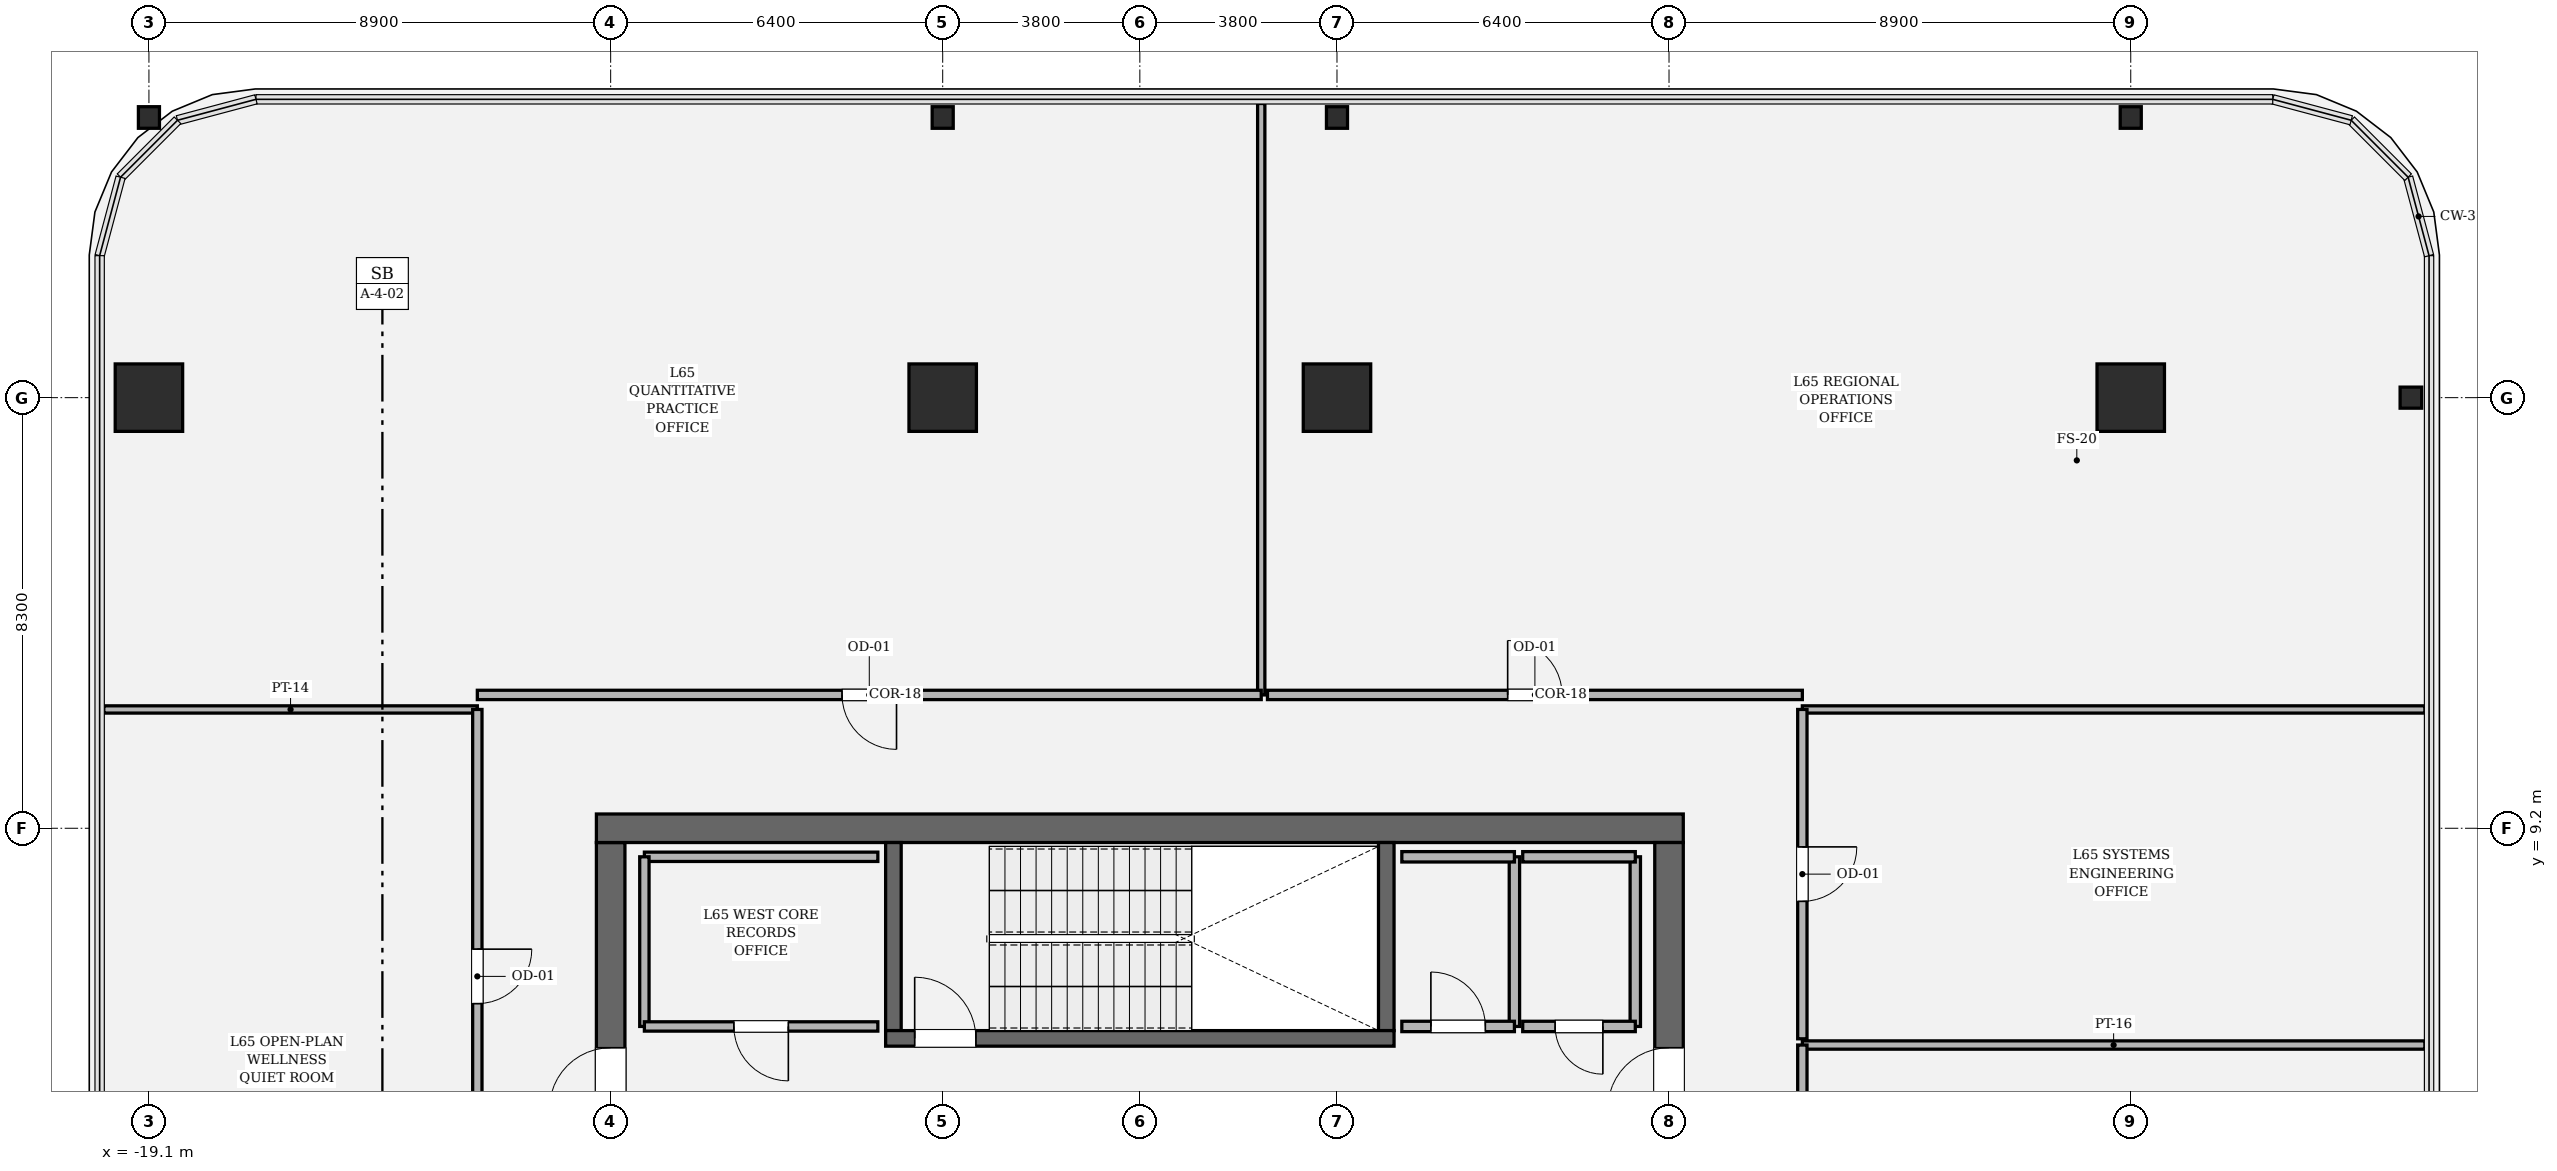
"""IFC4 building model, lengths in metres.
Left out: names, types, materials, properties, quantities, classifications, styles, units other than length and angle.
Written with IfcOpenShell. Run it as: python <this file> out.ifc"""

import sys

from ifc_helpers import new_model, si_unit, direction, frame, frame_2d, origin, origin_2d, place, context, subcontext, project, spatial, rectangle, hollow_rectangle, i_section, extrude, element, fill, save


model = new_model("IFC4")
c1 = context("Model", 3, precision=1e-05, world=origin(), true_north=direction((0.0, 1.0)))
c2 = subcontext(c1, "Body", "Model", "MODEL_VIEW")
j1 = project(units=[si_unit("LENGTHUNIT", "METRE"), si_unit("PLANEANGLEUNIT", "RADIAN")], contexts=[c1])
p1 = place(None, origin())
s1 = spatial("IfcSite", under=j1, at=p1, CompositionType="ELEMENT")
p2 = place(p1, origin())
s2 = spatial("IfcBuilding", under=s1, at=p2, CompositionType="ELEMENT")
p3 = place(p2, frame((0.0, 0.0, 275.7)))
s3 = spatial("IfcBuildingStorey", under=s2, at=p3, CompositionType="ELEMENT", Elevation=275.7)
p4 = place(p3, frame((-10.2, -8.925, 0.0), z_axis=(0.0, 0.0, 1.0), x_axis=(0.0, 1.0, 0.0)))
e1 = element("IfcWall", 1, at=p4, inside=s3, PredefinedType="SHEAR", context=c2, shape_type="SweptSolid", body=[
    extrude(rectangle(XDim=17.85, YDim=0.55, at=frame_2d((8.925, 0.0))), origin(), (0.0, 0.0, 1.0), 4.05),
])
p5 = place(p4, frame((12.715, 0.0, 0.0)))
e2 = element("IfcOpeningElement", 2, at=p5, cuts=e1, PredefinedType="OPENING", context=c2, shape_type="SweptSolid", body=[
    extrude(rectangle(XDim=1.18, YDim=2.2, at=frame_2d((0.59, 1.1))), frame((0.0, 0.285, 0.0), z_axis=(0.0, -1.0, 0.0), x_axis=(1.0, 0.0, 0.0)), (0.0, 0.0, 1.0), 0.57),
])
p6 = place(p3, frame((-10.475, 9.2, 0.0), z_axis=(0.0, 0.0, 1.0), x_axis=(1.0, 0.0, 0.0)))
e3 = element("IfcWall", 3, at=p6, inside=s3, PredefinedType="SHEAR", context=c2, shape_type="SweptSolid", body=[
    extrude(rectangle(XDim=20.95, YDim=0.55, at=frame_2d((10.475, 0.0))), origin(), (0.0, 0.0, 1.0), 4.05),
])
p7 = place(p3, frame((10.2, 8.925, 0.0), z_axis=(0.0, 0.0, 1.0), x_axis=(0.0, -1.0, 0.0)))
e4 = element("IfcWall", 4, at=p7, inside=s3, PredefinedType="SHEAR", context=c2, shape_type="SweptSolid", body=[
    extrude(rectangle(XDim=17.85, YDim=0.55, at=frame_2d((8.925, 0.0))), origin(), (0.0, 0.0, 1.0), 4.05),
])
p8 = place(p7, frame((3.955, 0.0, 0.0)))
e5 = element("IfcOpeningElement", 5, at=p8, cuts=e4, PredefinedType="OPENING", context=c2, shape_type="SweptSolid", body=[
    extrude(rectangle(XDim=1.18, YDim=2.2, at=frame_2d((0.59, 1.1))), frame((0.0, 0.285, 0.0), z_axis=(0.0, -1.0, 0.0), x_axis=(1.0, 0.0, 0.0)), (0.0, 0.0, 1.0), 0.57),
])
for number, where, z_axis, x_axis in (
    (6, (-4.75, 5.3, 0.0), (0.0, 0.0, 1.0), (0.0, 1.0, 0.0)),
    (7, (4.75, 8.925, 0.0), (0.0, 0.0, 1.0), (0.0, -1.0, 0.0)),
):
    element("IfcWall", number, at=place(p3, frame(where, z_axis=z_axis, x_axis=x_axis)), inside=s3, PredefinedType="SOLIDWALL", context=c2, shape_type="SweptSolid", body=[
        extrude(rectangle(XDim=3.625, YDim=0.3, at=frame_2d((1.812, 0.0))), origin(), (0.0, 0.0, 1.0), 4.05),
    ])
p9 = place(p3, frame((-4.9, 5.15, 0.0), z_axis=(0.0, 0.0, 1.0), x_axis=(1.0, 0.0, 0.0)))
e8 = element("IfcWall", 8, at=p9, inside=s3, PredefinedType="SOLIDWALL", context=c2, shape_type="SweptSolid", body=[
    extrude(rectangle(XDim=9.8, YDim=0.3, at=frame_2d((4.9, 0.0))), origin(), (0.0, 0.0, 1.0), 4.05),
])
p10 = place(p9, frame((0.56, 0.0, 0.0)))
e9 = element("IfcOpeningElement", 9, at=p10, cuts=e8, PredefinedType="OPENING", context=c2, shape_type="SweptSolid", body=[
    extrude(rectangle(XDim=1.18, YDim=2.2, at=frame_2d((0.59, 1.1))), frame((0.0, 0.16, 0.0), z_axis=(0.0, -1.0, 0.0), x_axis=(1.0, 0.0, 0.0)), (0.0, 0.0, 1.0), 0.32),
])
for number, where, z_axis, x_axis in (
    (10, (19.1, 17.5, 0.0), (0.0, 0.0, 1.0), (1.0, 0.0, 0.0)),
    (11, (3.8, 17.5, 0.0), (0.0, 0.0, 1.0), (1.0, 0.0, 0.0)),
    (12, (-3.8, 17.5, 0.0), (0.0, 0.0, 1.0), (1.0, 0.0, 0.0)),
    (13, (-19.1, 17.5, 0.0), (0.0, 0.0, 1.0), (1.0, 0.0, 0.0)),
):
    element("IfcColumn", number, at=place(p3, frame(where, z_axis=z_axis, x_axis=x_axis)), inside=s3, PredefinedType="COLUMN", context=c2, shape_type="SweptSolid", body=[
        extrude(hollow_rectangle(XDim=1.3, YDim=1.3, WallThickness=0.038, at=origin_2d()), origin(), (0.0, 0.0, 1.0), 4.05),
    ])
for number, where, z_axis, x_axis in (
    (14, (-19.1, 22.9, 0.0), (0.0, 0.0, 1.0), (1.0, 0.0, 0.0)),
    (15, (-3.8, 22.9, 0.0), (0.0, 0.0, 1.0), (1.0, 0.0, 0.0)),
    (16, (3.8, 22.9, 0.0), (0.0, 0.0, 1.0), (1.0, 0.0, 0.0)),
    (17, (19.1, 22.9, 0.0), (0.0, 0.0, 1.0), (1.0, 0.0, 0.0)),
    (18, (24.5, 17.5, 0.0), (0.0, 0.0, 1.0), (0.0, 1.0, 0.0)),
):
    element("IfcColumn", number, at=place(p3, frame(where, z_axis=z_axis, x_axis=x_axis)), inside=s3, PredefinedType="COLUMN", context=c2, shape_type="SweptSolid", body=[
        extrude(i_section(OverallWidth=0.406, OverallDepth=0.416, WebThickness=0.029, FlangeThickness=0.048, FilletRadius=0.018, at=origin_2d()), origin(), (0.0, 0.0, 1.0), 4.048),
    ])
p11 = place(p3, frame((-5.05, 8.65, 0.0), z_axis=(0.0, 0.0, 1.0), x_axis=(-1.0, 0.0, 0.0)))
e19 = element("IfcWall", 19, at=p11, inside=s3, PredefinedType="PARTITIONING", context=c2, shape_type="SweptSolid", body=[
    extrude(rectangle(XDim=4.5, YDim=0.18, at=frame_2d((2.25, 0.0))), origin(), (0.0, 0.0, 1.0), 3.85),
])
p12 = place(p3, frame((-9.55, 8.65, 0.0), z_axis=(0.0, 0.0, 1.0), x_axis=(0.0, -1.0, 0.0)))
e20 = element("IfcWall", 20, at=p12, inside=s3, PredefinedType="PARTITIONING", context=c2, shape_type="SweptSolid", body=[
    extrude(rectangle(XDim=3.27, YDim=0.18, at=frame_2d((1.635, 0.0))), origin(), (0.0, 0.0, 1.0), 3.85),
])
p13 = place(p3, frame((-9.55, 5.38, 0.0), z_axis=(0.0, 0.0, 1.0), x_axis=(1.0, 0.0, 0.0)))
e21 = element("IfcWall", 21, at=p13, inside=s3, PredefinedType="PARTITIONING", context=c2, shape_type="SweptSolid", body=[
    extrude(rectangle(XDim=4.5, YDim=0.18, at=frame_2d((2.25, 0.0))), origin(), (0.0, 0.0, 1.0), 3.85),
])
p14 = place(p13, frame((1.725, 0.0, 0.0)))
e22 = element("IfcOpeningElement", 22, at=p14, cuts=e21, PredefinedType="OPENING", context=c2, shape_type="SweptSolid", body=[
    extrude(rectangle(XDim=1.05, YDim=2.2, at=frame_2d((0.525, 1.1))), frame((0.0, 0.1, 0.0), z_axis=(0.0, -1.0, 0.0), x_axis=(1.0, 0.0, 0.0)), (0.0, 0.0, 1.0), 0.2),
])
p15 = place(p3, frame((7.22, 5.38, 0.0), z_axis=(0.0, 0.0, 1.0), x_axis=(0.0, 1.0, 0.0)))
e23 = element("IfcWall", 23, at=p15, inside=s3, PredefinedType="SOLIDWALL", context=c2, shape_type="SweptSolid", body=[
    extrude(rectangle(XDim=3.27, YDim=0.2, at=frame_2d((1.635, 0.0))), origin(), (0.0, 0.0, 1.0), 3.85),
])
p16 = place(p3, frame((7.22, 8.65, 0.0), z_axis=(0.0, 0.0, 1.0), x_axis=(-1.0, 0.0, 0.0)))
e24 = element("IfcWall", 24, at=p16, inside=s3, PredefinedType="SOLIDWALL", context=c2, shape_type="SweptSolid", body=[
    extrude(rectangle(XDim=2.17, YDim=0.2, at=frame_2d((1.085, 0.0))), origin(), (0.0, 0.0, 1.0), 3.85),
])
p17 = place(p3, frame((5.05, 5.38, 0.0), z_axis=(0.0, 0.0, 1.0), x_axis=(1.0, 0.0, 0.0)))
e25 = element("IfcWall", 25, at=p17, inside=s3, PredefinedType="SOLIDWALL", context=c2, shape_type="SweptSolid", body=[
    extrude(rectangle(XDim=2.17, YDim=0.2, at=frame_2d((1.085, 0.0))), origin(), (0.0, 0.0, 1.0), 3.85),
])
p18 = place(p17, frame((0.56, 0.0, 0.0)))
e26 = element("IfcOpeningElement", 26, at=p18, cuts=e25, PredefinedType="OPENING", context=c2, shape_type="SweptSolid", body=[
    extrude(rectangle(XDim=1.05, YDim=2.2, at=frame_2d((0.525, 1.1))), frame((0.0, 0.11, 0.0), z_axis=(0.0, -1.0, 0.0), x_axis=(1.0, 0.0, 0.0)), (0.0, 0.0, 1.0), 0.22),
])
p19 = place(p3, frame((9.55, 5.38, 0.0), z_axis=(0.0, 0.0, 1.0), x_axis=(0.0, 1.0, 0.0)))
e27 = element("IfcWall", 27, at=p19, inside=s3, PredefinedType="SOLIDWALL", context=c2, shape_type="SweptSolid", body=[
    extrude(rectangle(XDim=3.27, YDim=0.2, at=frame_2d((1.635, 0.0))), origin(), (0.0, 0.0, 1.0), 3.85),
])
p20 = place(p3, frame((9.55, 8.65, 0.0), z_axis=(0.0, 0.0, 1.0), x_axis=(-1.0, 0.0, 0.0)))
e28 = element("IfcWall", 28, at=p20, inside=s3, PredefinedType="SOLIDWALL", context=c2, shape_type="SweptSolid", body=[
    extrude(rectangle(XDim=2.17, YDim=0.2, at=frame_2d((1.085, 0.0))), origin(), (0.0, 0.0, 1.0), 3.85),
])
p21 = place(p3, frame((7.38, 5.38, 0.0), z_axis=(0.0, 0.0, 1.0), x_axis=(1.0, 0.0, 0.0)))
e29 = element("IfcWall", 29, at=p21, inside=s3, PredefinedType="SOLIDWALL", context=c2, shape_type="SweptSolid", body=[
    extrude(rectangle(XDim=2.17, YDim=0.2, at=frame_2d((1.085, 0.0))), origin(), (0.0, 0.0, 1.0), 3.85),
])
p22 = place(p21, frame((0.625, 0.0, 0.0)))
e30 = element("IfcOpeningElement", 30, at=p22, cuts=e29, PredefinedType="OPENING", context=c2, shape_type="SweptSolid", body=[
    extrude(rectangle(XDim=0.92, YDim=2.1, at=frame_2d((0.46, 1.05))), frame((0.0, 0.11, 0.0), z_axis=(0.0, -1.0, 0.0), x_axis=(1.0, 0.0, 0.0)), (0.0, 0.0, 1.0), 0.22),
])
p23 = place(p3, frame((12.77, 5.022, 0.0), z_axis=(0.0, 0.0, 1.0), x_axis=(1.0, 0.0, 0.0)))
e31 = element("IfcWall", 31, at=p23, inside=s3, PredefinedType="PARTITIONING", context=c2, shape_type="SweptSolid", body=[
    extrude(rectangle(XDim=12.0, YDim=0.16, at=frame_2d((6.0, 0.0))), origin(), (0.0, 0.0, 1.0), 2.564),
])
p24 = place(p3, frame((12.77, 0.06, 0.0), z_axis=(0.0, 0.0, 1.0), x_axis=(0.0, 1.0, 0.0)))
e32 = element("IfcWall", 32, at=p24, inside=s3, PredefinedType="PARTITIONING", context=c2, shape_type="SweptSolid", body=[
    extrude(rectangle(XDim=4.962, YDim=0.18, at=frame_2d((2.481, 0.0))), origin(), (0.0, 0.0, 1.0), 3.244),
])
p25 = place(p24, frame((1.956, 0.0, 0.0)))
e33 = element("IfcOpeningElement", 33, at=p25, cuts=e32, PredefinedType="OPENING", context=c2, shape_type="SweptSolid", body=[
    extrude(rectangle(XDim=1.05, YDim=2.2, at=frame_2d((0.525, 1.1))), frame((0.0, 0.1, 0.0), z_axis=(0.0, -1.0, 0.0), x_axis=(1.0, 0.0, 0.0)), (0.0, 0.0, 1.0), 0.2),
])
p26 = place(p3, frame((-19.97, 11.49, 0.0), z_axis=(0.0, 0.0, 1.0), x_axis=(1.0, 0.0, 0.0)))
e34 = element("IfcWall", 34, at=p26, inside=s3, PredefinedType="PARTITIONING", context=c2, shape_type="SweptSolid", body=[
    extrude(rectangle(XDim=7.2, YDim=0.14, at=frame_2d((3.6, 0.0))), origin(), (0.0, 0.0, 1.0), 3.244),
])
p27 = place(p3, frame((-12.77, 11.49, 0.0), z_axis=(0.0, 0.0, 1.0), x_axis=(0.0, -1.0, 0.0)))
e35 = element("IfcWall", 35, at=p27, inside=s3, PredefinedType="PARTITIONING", context=c2, shape_type="SweptSolid", body=[
    extrude(rectangle(XDim=10.29, YDim=0.18, at=frame_2d((5.145, 0.0))), origin(), (0.0, 0.0, 1.0), 3.244),
])
p28 = place(p27, frame((4.62, 0.0, 0.0)))
e36 = element("IfcOpeningElement", 36, at=p28, cuts=e35, PredefinedType="OPENING", context=c2, shape_type="SweptSolid", body=[
    extrude(rectangle(XDim=1.05, YDim=2.2, at=frame_2d((0.525, 1.1))), frame((0.0, 0.1, 0.0), z_axis=(0.0, -1.0, 0.0), x_axis=(1.0, 0.0, 0.0)), (0.0, 0.0, 1.0), 0.2),
])
p29 = place(p3, frame((12.77, 11.49, 0.0), z_axis=(0.0, 0.0, 1.0), x_axis=(1.0, 0.0, 0.0)))
e37 = element("IfcWall", 37, at=p29, inside=s3, PredefinedType="PARTITIONING", context=c2, shape_type="SweptSolid", body=[
    extrude(rectangle(XDim=12.0, YDim=0.14, at=frame_2d((6.0, 0.0))), origin(), (0.0, 0.0, 1.0), 2.564),
])
p30 = place(p3, frame((12.77, 5.142, 0.0), z_axis=(0.0, 0.0, 1.0), x_axis=(0.0, 1.0, 0.0)))
e38 = element("IfcWall", 38, at=p30, inside=s3, PredefinedType="PARTITIONING", context=c2, shape_type="SweptSolid", body=[
    extrude(rectangle(XDim=6.348, YDim=0.18, at=frame_2d((3.174, 0.0))), origin(), (0.0, 0.0, 1.0), 3.244),
])
p31 = place(p30, frame((2.649, 0.0, 0.0)))
e39 = element("IfcOpeningElement", 39, at=p31, cuts=e38, PredefinedType="OPENING", context=c2, shape_type="SweptSolid", body=[
    extrude(rectangle(XDim=1.05, YDim=2.2, at=frame_2d((0.525, 1.1))), frame((0.0, 0.1, 0.0), z_axis=(0.0, -1.0, 0.0), x_axis=(1.0, 0.0, 0.0)), (0.0, 0.0, 1.0), 0.2),
])
p32 = place(p3, frame((2.34, 23.17, 0.0), z_axis=(0.0, 0.0, 1.0), x_axis=(0.0, -1.0, 0.0)))
e40 = element("IfcWall", 40, at=p32, inside=s3, PredefinedType="PARTITIONING", context=c2, shape_type="SweptSolid", body=[
    extrude(rectangle(XDim=11.4, YDim=0.14, at=frame_2d((5.7, 0.0))), origin(), (0.0, 0.0, 1.0), 2.564),
])
p33 = place(p3, frame((2.34, 11.77, 0.0), z_axis=(0.0, 0.0, 1.0), x_axis=(-1.0, 0.0, 0.0)))
e41 = element("IfcWall", 41, at=p33, inside=s3, PredefinedType="PARTITIONING", context=c2, shape_type="SweptSolid", body=[
    extrude(rectangle(XDim=15.11, YDim=0.18, at=frame_2d((7.555, 0.0))), origin(), (0.0, 0.0, 1.0), 3.244),
])
p34 = place(p33, frame((7.03, 0.0, 0.0)))
e42 = element("IfcOpeningElement", 42, at=p34, cuts=e41, PredefinedType="OPENING", context=c2, shape_type="SweptSolid", body=[
    extrude(rectangle(XDim=1.05, YDim=2.2, at=frame_2d((0.525, 1.1))), frame((0.0, 0.1, 0.0), z_axis=(0.0, -1.0, 0.0), x_axis=(1.0, 0.0, 0.0)), (0.0, 0.0, 1.0), 0.2),
])
p35 = place(p3, frame((12.77, 11.77, 0.0), z_axis=(0.0, 0.0, 1.0), x_axis=(-1.0, 0.0, 0.0)))
e43 = element("IfcWall", 43, at=p35, inside=s3, PredefinedType="PARTITIONING", context=c2, shape_type="SweptSolid", body=[
    extrude(rectangle(XDim=10.31, YDim=0.18, at=frame_2d((5.155, 0.0))), origin(), (0.0, 0.0, 1.0), 3.244),
])
p36 = place(p35, frame((4.63, 0.0, 0.0)))
e44 = element("IfcOpeningElement", 44, at=p36, cuts=e43, PredefinedType="OPENING", context=c2, shape_type="SweptSolid", body=[
    extrude(rectangle(XDim=1.05, YDim=2.2, at=frame_2d((0.525, 1.1))), frame((0.0, 0.1, 0.0), z_axis=(0.0, -1.0, 0.0), x_axis=(1.0, 0.0, 0.0)), (0.0, 0.0, 1.0), 0.2),
])
p37 = place(p10, origin())
e45 = element("IfcDoor", 45, at=p37, inside=s3, OperationType="SINGLE_SWING_LEFT", PredefinedType="DOOR", context=c2, shape_type="SweptSolid", body=[
    extrude(rectangle(XDim=1.18, YDim=2.2, at=frame_2d((0.59, 1.1))), frame((0.0, 0.025, 0.0), z_axis=(0.0, -1.0, 0.0), x_axis=(1.0, 0.0, 0.0)), (0.0, 0.0, 1.0), 0.05),
])
fill(e9, e45)
p38 = place(p5, origin())
e46 = element("IfcDoor", 46, at=p38, inside=s3, OperationType="SINGLE_SWING_LEFT", PredefinedType="DOOR", context=c2, shape_type="SweptSolid", body=[
    extrude(rectangle(XDim=1.18, YDim=2.2, at=frame_2d((0.59, 1.1))), frame((0.0, 0.025, 0.0), z_axis=(0.0, -1.0, 0.0), x_axis=(1.0, 0.0, 0.0)), (0.0, 0.0, 1.0), 0.05),
])
fill(e2, e46)
p39 = place(p8, origin())
e47 = element("IfcDoor", 47, at=p39, inside=s3, OperationType="SINGLE_SWING_RIGHT", PredefinedType="DOOR", context=c2, shape_type="SweptSolid", body=[
    extrude(rectangle(XDim=1.18, YDim=2.2, at=frame_2d((0.59, 1.1))), frame((0.0, 0.025, 0.0), z_axis=(0.0, -1.0, 0.0), x_axis=(1.0, 0.0, 0.0)), (0.0, 0.0, 1.0), 0.05),
])
fill(e5, e47)
p40 = place(p14, origin())
e48 = element("IfcDoor", 48, at=p40, inside=s3, OperationType="SINGLE_SWING_RIGHT", PredefinedType="DOOR", context=c2, shape_type="SweptSolid", body=[
    extrude(rectangle(XDim=1.05, YDim=2.2, at=frame_2d((0.525, 1.1))), frame((0.0, 0.025, 0.0), z_axis=(0.0, -1.0, 0.0), x_axis=(1.0, 0.0, 0.0)), (0.0, 0.0, 1.0), 0.05),
])
fill(e22, e48)
p41 = place(p18, origin())
e49 = element("IfcDoor", 49, at=p41, inside=s3, OperationType="SINGLE_SWING_LEFT", PredefinedType="DOOR", context=c2, shape_type="SweptSolid", body=[
    extrude(rectangle(XDim=1.05, YDim=2.2, at=frame_2d((0.525, 1.1))), frame((0.0, 0.025, 0.0), z_axis=(0.0, -1.0, 0.0), x_axis=(1.0, 0.0, 0.0)), (0.0, 0.0, 1.0), 0.05),
])
fill(e26, e49)
p42 = place(p22, origin())
e50 = element("IfcDoor", 50, at=p42, inside=s3, OperationType="SINGLE_SWING_RIGHT", PredefinedType="DOOR", context=c2, shape_type="SweptSolid", body=[
    extrude(rectangle(XDim=0.92, YDim=2.1, at=frame_2d((0.46, 1.05))), frame((0.0, 0.025, 0.0), z_axis=(0.0, -1.0, 0.0), x_axis=(1.0, 0.0, 0.0)), (0.0, 0.0, 1.0), 0.05),
])
fill(e30, e50)
p43 = place(p28, origin())
e51 = element("IfcDoor", 51, at=p43, inside=s3, OperationType="SINGLE_SWING_LEFT", PredefinedType="DOOR", context=c2, shape_type="SweptSolid", body=[
    extrude(rectangle(XDim=1.05, YDim=2.2, at=frame_2d((0.525, 1.1))), frame((0.0, 0.025, 0.0), z_axis=(0.0, -1.0, 0.0), x_axis=(1.0, 0.0, 0.0)), (0.0, 0.0, 1.0), 0.05),
])
fill(e36, e51)
p44 = place(p31, origin())
e52 = element("IfcDoor", 52, at=p44, inside=s3, OperationType="SINGLE_SWING_RIGHT", PredefinedType="DOOR", context=c2, shape_type="SweptSolid", body=[
    extrude(rectangle(XDim=1.05, YDim=2.2, at=frame_2d((0.525, 1.1))), frame((0.0, 0.025, 0.0), z_axis=(0.0, -1.0, 0.0), x_axis=(1.0, 0.0, 0.0)), (0.0, 0.0, 1.0), 0.05),
])
fill(e39, e52)
p45 = place(p34, origin())
e53 = element("IfcDoor", 53, at=p45, inside=s3, OperationType="SINGLE_SWING_LEFT", PredefinedType="DOOR", context=c2, shape_type="SweptSolid", body=[
    extrude(rectangle(XDim=1.05, YDim=2.2, at=frame_2d((0.525, 1.1))), frame((0.0, 0.025, 0.0), z_axis=(0.0, -1.0, 0.0), x_axis=(1.0, 0.0, 0.0)), (0.0, 0.0, 1.0), 0.05),
])
fill(e42, e53)
p46 = place(p36, origin())
e54 = element("IfcDoor", 54, at=p46, inside=s3, OperationType="SINGLE_SWING_RIGHT", PredefinedType="DOOR", context=c2, shape_type="SweptSolid", body=[
    extrude(rectangle(XDim=1.05, YDim=2.2, at=frame_2d((0.525, 1.1))), frame((0.0, 0.025, 0.0), z_axis=(0.0, -1.0, 0.0), x_axis=(1.0, 0.0, 0.0)), (0.0, 0.0, 1.0), 0.05),
])
fill(e44, e54)
save(model, sys.argv[1])
